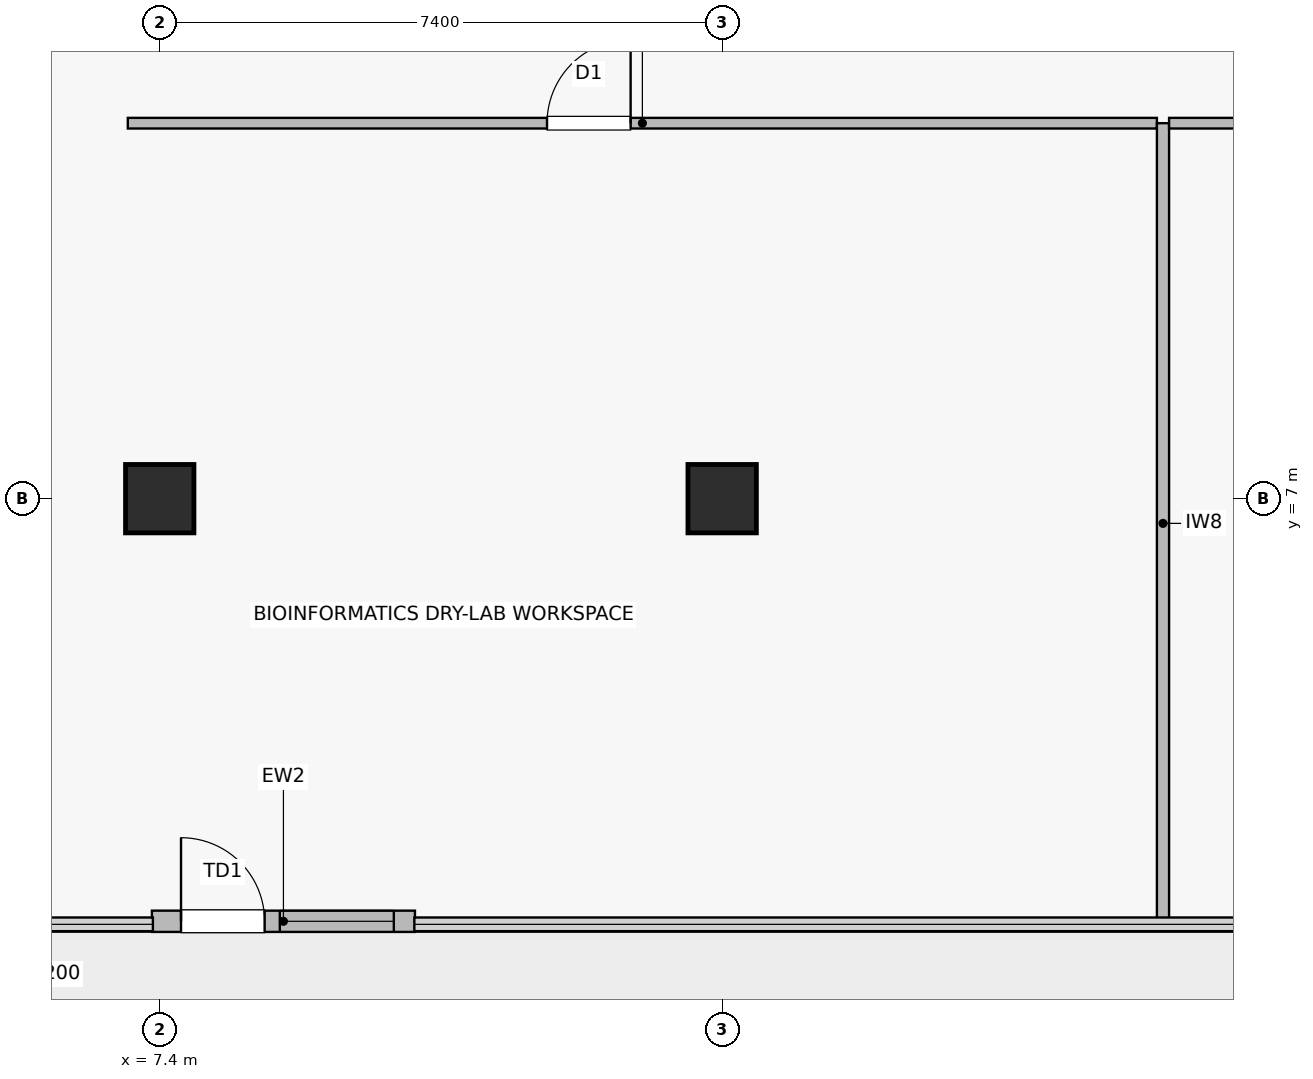
"""IFC4 building model, lengths in metres.
Left out: names, types, materials, properties, quantities, classifications, styles, units other than length and angle.
Written with IfcOpenShell. Run it as: python <this file> out.ifc"""

import sys

from ifc_helpers import new_model, si_unit, direction, frame, frame_2d, origin, origin_2d, place, context, subcontext, project, spatial, rectangle, extrude, source, transform, mapped, element, fill, save


model = new_model("IFC4")
c1 = context("Model", 3, precision=1e-05, world=origin(), true_north=direction((0.0, 1.0)))
c2 = subcontext(c1, "Body", "Model", "MODEL_VIEW")
j1 = project(units=[si_unit("LENGTHUNIT", "METRE"), si_unit("PLANEANGLEUNIT", "RADIAN")], contexts=[c1])
p1 = place(None, origin())
s1 = spatial("IfcSite", under=j1, at=p1, CompositionType="ELEMENT")
p2 = place(p1, origin())
s2 = spatial("IfcBuilding", under=s1, at=p2, CompositionType="ELEMENT")
p3 = place(p2, frame((0.0, 0.0, 113.3)))
s3 = spatial("IfcBuildingStorey", under=s2, at=p3, CompositionType="ELEMENT", Elevation=113.3)
m1 = source(origin(), c2, "Body", "SweptSolid", [
    extrude(rectangle(XDim=0.9, YDim=0.9, at=origin_2d()), origin(), (0.0, 0.0, 1.0), 4.1),
])
for number, where, z_axis, x_axis in (
    (1, (14.8, 7.0, 0.0), (0.0, 0.0, 1.0), (1.0, 0.0, 0.0)),
    (2, (7.4, 7.0, 0.0), (0.0, 0.0, 1.0), (1.0, 0.0, 0.0)),
):
    element("IfcColumn", number, at=place(p3, frame(where, z_axis=z_axis, x_axis=x_axis)), inside=s3, PredefinedType="COLUMN", context=c2, shape_type="MappedRepresentation", body=[
        mapped(m1, transform((0.0, 0.0, 0.0), scale=1.0)),
    ])
p4 = place(p3, frame((7.297, 1.44, 0.0), z_axis=(0.0, 0.0, 1.0), x_axis=(1.0, 0.0, 0.0)))
e3 = element("IfcWall", 3, at=p4, inside=s3, PredefinedType="STANDARD", context=c2, shape_type="SweptSolid", body=[
    extrude(rectangle(XDim=3.461, YDim=0.28, at=frame_2d((1.73, 0.0))), origin(), (0.0, 0.0, 1.0), 3.79),
])
p5 = place(p4, frame((0.383, 0.0, 0.0)))
e4 = element("IfcOpeningElement", 4, at=p5, cuts=e3, PredefinedType="OPENING", context=c2, shape_type="SweptSolid", body=[
    extrude(rectangle(XDim=1.1, YDim=2.2, at=frame_2d((0.55, 1.1))), frame((0.0, 0.15, 0.0), z_axis=(0.0, -1.0, 0.0), x_axis=(1.0, 0.0, 0.0)), (0.0, 0.0, 1.0), 0.3),
])
p6 = place(p4, frame((1.683, 0.0, 0.9)))
e5 = element("IfcOpeningElement", 5, at=p6, cuts=e3, PredefinedType="OPENING", context=c2, shape_type="SweptSolid", body=[
    extrude(rectangle(XDim=1.5, YDim=2.2, at=frame_2d((0.75, 1.1))), frame((0.0, 0.15, 0.0), z_axis=(0.0, -1.0, 0.0), x_axis=(1.0, 0.0, 0.0)), (0.0, 0.0, 1.0), 0.3),
])
p7 = place(p3, frame((6.98, 11.94, 0.0), z_axis=(0.0, 0.0, 1.0), x_axis=(1.0, 0.0, 0.0)))
e6 = element("IfcWall", 6, at=p7, inside=s3, PredefinedType="PARTITIONING", context=c2, shape_type="SweptSolid", body=[
    extrude(rectangle(XDim=13.54, YDim=0.14, at=frame_2d((6.77, 0.0))), origin(), (0.0, 0.0, 1.0), 3.125),
])
p8 = place(p7, frame((5.516, 0.0, 0.0)))
e7 = element("IfcOpeningElement", 7, at=p8, cuts=e6, PredefinedType="OPENING", context=c2, shape_type="SweptSolid", body=[
    extrude(rectangle(XDim=1.1, YDim=2.18, at=frame_2d((0.55, 1.09))), frame((0.0, 0.08, 0.0), z_axis=(0.0, -1.0, 0.0), x_axis=(1.0, 0.0, 0.0)), (0.0, 0.0, 1.0), 0.16),
])
p9 = place(p3, frame((20.6, 1.41, 0.0), z_axis=(0.0, 0.0, 1.0), x_axis=(0.0, 1.0, 0.0)))
e8 = element("IfcWall", 8, at=p9, inside=s3, PredefinedType="PARTITIONING", context=c2, shape_type="SweptSolid", body=[
    extrude(rectangle(XDim=10.53, YDim=0.16, at=frame_2d((5.265, 0.0))), origin(), (0.0, 0.0, 1.0), 3.075),
])
p10 = place(p3, frame((20.68, 11.94, 0.0), z_axis=(0.0, 0.0, 1.0), x_axis=(1.0, 0.0, 0.0)))
e9 = element("IfcWall", 9, at=p10, inside=s3, PredefinedType="PARTITIONING", context=c2, shape_type="SweptSolid", body=[
    extrude(rectangle(XDim=19.04, YDim=0.14, at=frame_2d((9.52, 0.0))), origin(), (0.0, 0.0, 1.0), 3.125),
])
p11 = place(p10, frame((10.004, 0.0, 0.0)))
e10 = element("IfcOpeningElement", 10, at=p11, cuts=e9, PredefinedType="OPENING", context=c2, shape_type="SweptSolid", body=[
    extrude(rectangle(XDim=1.1, YDim=2.18, at=frame_2d((0.55, 1.09))), frame((0.0, 0.08, 0.0), z_axis=(0.0, -1.0, 0.0), x_axis=(1.0, 0.0, 0.0)), (0.0, 0.0, 1.0), 0.16),
])
m2 = source(origin(), c2, "Body", "SweptSolid", [
    extrude(rectangle(XDim=1.1, YDim=2.2, at=frame_2d((0.55, 1.1))), frame((0.0, 0.025, 0.0), z_axis=(0.0, -1.0, 0.0), x_axis=(1.0, 0.0, 0.0)), (0.0, 0.0, 1.0), 0.05),
])
p12 = place(p5, origin())
e11 = element("IfcDoor", 11, at=p12, inside=s3, OperationType="SINGLE_SWING_LEFT", PredefinedType="DOOR", context=c2, shape_type="MappedRepresentation", body=[
    mapped(m2, transform((0.0, 0.0, 0.0), scale=1.0)),
])
fill(e4, e11)
m3 = source(origin(), c2, "Body", "SweptSolid", [
    extrude(rectangle(XDim=1.5, YDim=2.2, at=frame_2d((0.75, 1.1))), frame((0.0, 0.03, 0.0), z_axis=(0.0, -1.0, 0.0), x_axis=(1.0, 0.0, 0.0)), (0.0, 0.0, 1.0), 0.06),
])
p13 = place(p6, origin())
e12 = element("IfcWindow", 12, at=p13, inside=s3, PartitioningType="SINGLE_PANEL", PredefinedType="WINDOW", context=c2, shape_type="MappedRepresentation", body=[
    mapped(m3, transform((0.0, 0.0, 0.0), scale=1.0)),
])
fill(e5, e12)
m4 = source(origin(), c2, "Body", "SweptSolid", [
    extrude(rectangle(XDim=1.1, YDim=2.18, at=frame_2d((0.55, 1.09))), frame((0.0, 0.025, 0.0), z_axis=(0.0, -1.0, 0.0), x_axis=(1.0, 0.0, 0.0)), (0.0, 0.0, 1.0), 0.05),
])
p14 = place(p8, origin())
e13 = element("IfcDoor", 13, at=p14, inside=s3, OperationType="SINGLE_SWING_RIGHT", PredefinedType="DOOR", context=c2, shape_type="MappedRepresentation", body=[
    mapped(m4, transform((0.0, 0.0, 0.0), scale=1.0)),
])
fill(e7, e13)
save(model, sys.argv[1])
